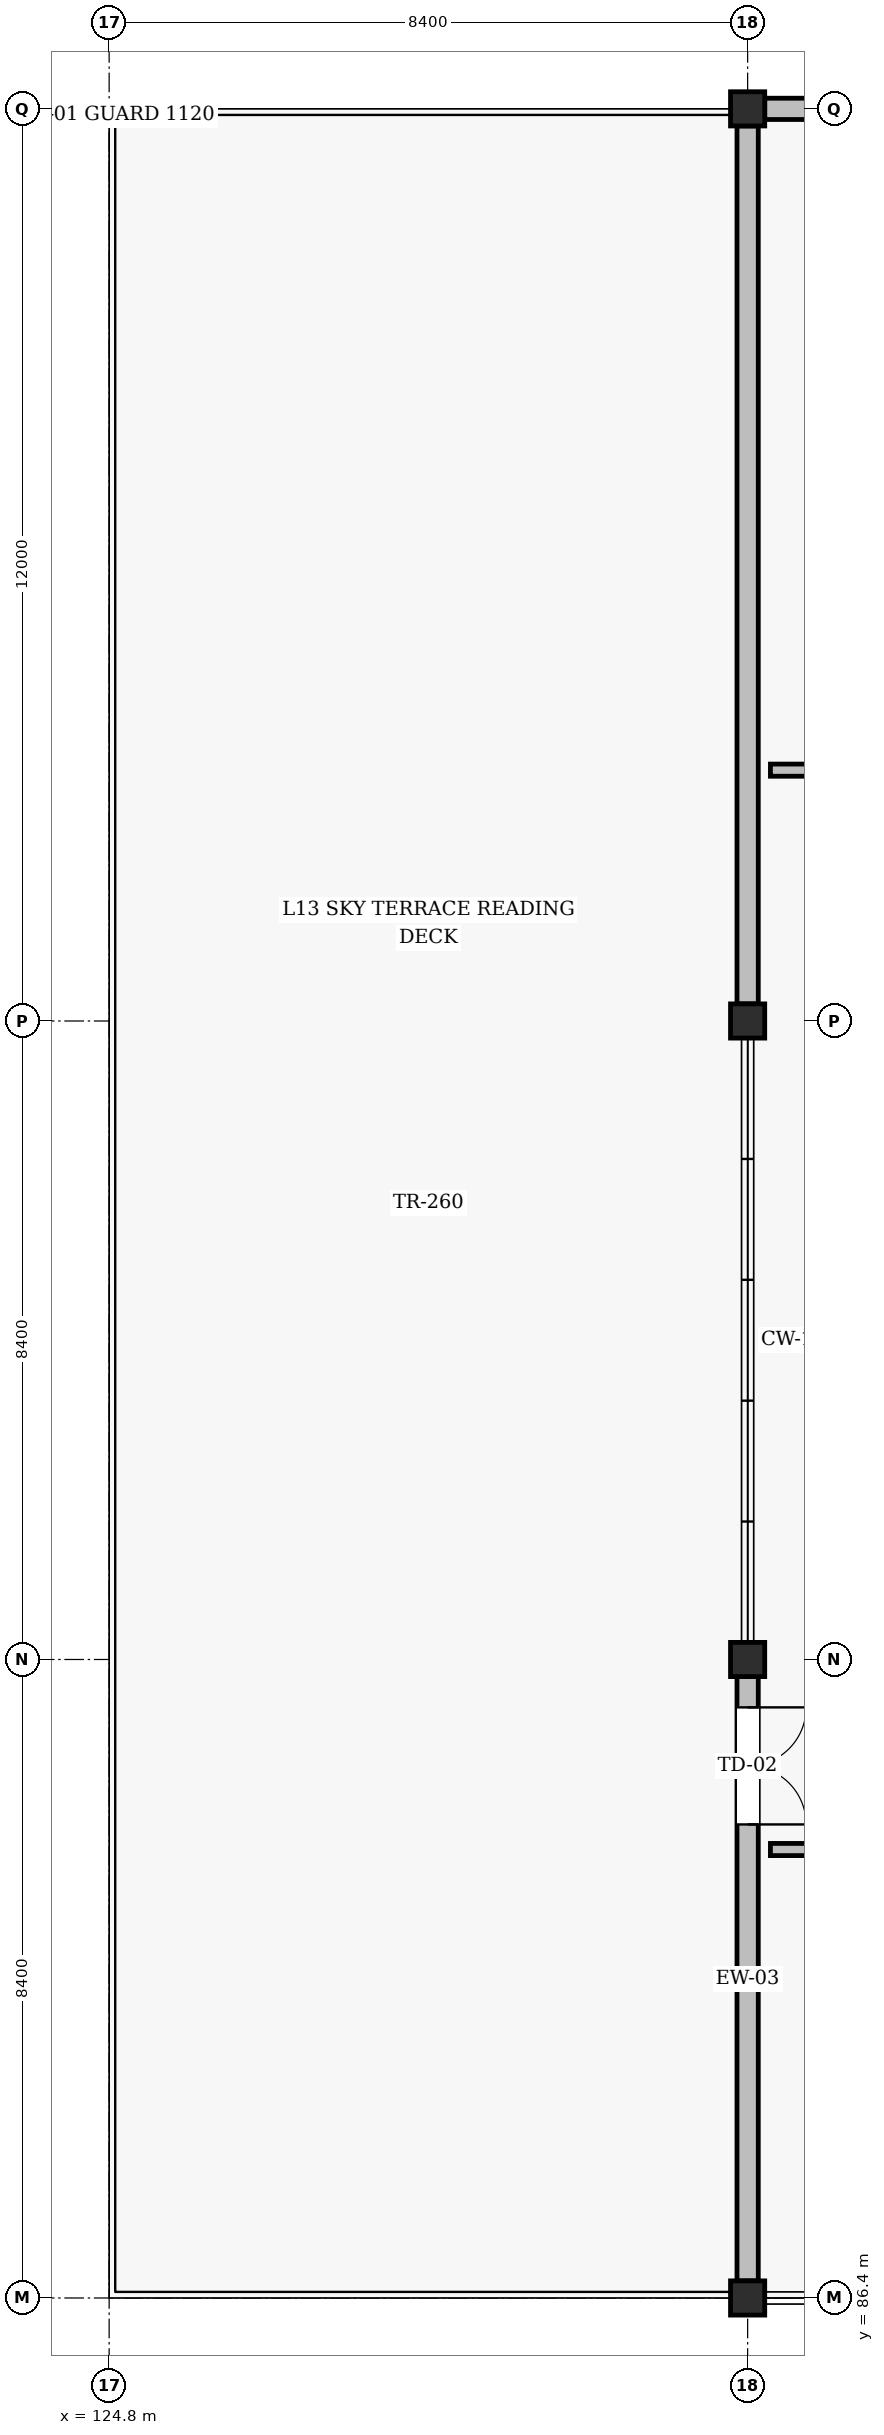
"""IFC4 building model, lengths in metres.
Left out: names, types, materials, properties, quantities, classifications, styles, units other than length and angle.
Written with IfcOpenShell. Run it as: python <this file> out.ifc"""

import sys

from ifc_helpers import new_model, si_unit, direction, frame, frame_2d, origin, origin_2d, place, context, subcontext, project, spatial, rectangle, hollow_rectangle, extrude, element, fill, save


model = new_model("IFC4")
c1 = context("Model", 3, precision=1e-05, world=origin(), true_north=direction((0.0, 1.0)))
c2 = subcontext(c1, "Body", "Model", "MODEL_VIEW")
j1 = project(units=[si_unit("LENGTHUNIT", "METRE"), si_unit("PLANEANGLEUNIT", "RADIAN")], contexts=[c1])
p1 = place(None, origin())
s1 = spatial("IfcSite", under=j1, at=p1, CompositionType="ELEMENT")
p2 = place(p1, origin())
s2 = spatial("IfcBuilding", under=s1, at=p2, CompositionType="ELEMENT")
p3 = place(p2, frame((0.0, 0.0, 50.4)))
s3 = spatial("IfcBuildingStorey", under=s2, at=p3, CompositionType="ELEMENT", Elevation=50.4)
for number, where, z_axis, x_axis in (
    (1, (133.2, 86.4, 0.0), (0.0, 0.0, 1.0), (1.0, 0.0, 0.0)),
    (2, (133.2, 94.8, 0.0), (0.0, 0.0, 1.0), (1.0, 0.0, 0.0)),
    (3, (133.2, 103.2, 0.0), (0.0, 0.0, 1.0), (1.0, 0.0, 0.0)),
    (4, (133.2, 115.2, 0.0), (0.0, 0.0, 1.0), (1.0, 0.0, 0.0)),
):
    element("IfcColumn", number, at=place(p3, frame(where, z_axis=z_axis, x_axis=x_axis)), inside=s3, PredefinedType="COLUMN", context=c2, shape_type="SweptSolid", body=[
        extrude(hollow_rectangle(XDim=0.45, YDim=0.45, WallThickness=0.018, InnerFilletRadius=0.018, OuterFilletRadius=0.036, at=origin_2d()), origin(), (0.0, 0.0, 1.0), 3.6),
    ])
p4 = place(p3, frame((141.375, 115.2, 0.0), z_axis=(0.0, 0.0, 1.0), x_axis=(-1.0, 0.0, 0.0)))
e5 = element("IfcWall", 5, at=p4, inside=s3, PredefinedType="SOLIDWALL", context=c2, shape_type="SweptSolid", body=[
    extrude(rectangle(XDim=7.95, YDim=0.28, at=frame_2d((3.975, 0.0))), origin(), (0.0, 0.0, 1.0), 2.846),
])
p5 = place(p3, frame((133.2, 114.975, 0.0), z_axis=(0.0, 0.0, 1.0), x_axis=(0.0, -1.0, 0.0)))
e6 = element("IfcWall", 6, at=p5, inside=s3, PredefinedType="SOLIDWALL", context=c2, shape_type="SweptSolid", body=[
    extrude(rectangle(XDim=11.55, YDim=0.28, at=frame_2d((5.775, 0.0))), origin(), (0.0, 0.0, 1.0), 2.554),
])
p6 = place(p3, frame((133.2, 94.575, 0.0), z_axis=(0.0, 0.0, 1.0), x_axis=(0.0, -1.0, 0.0)))
e7 = element("IfcWall", 7, at=p6, inside=s3, PredefinedType="SOLIDWALL", context=c2, shape_type="SweptSolid", body=[
    extrude(rectangle(XDim=7.95, YDim=0.28, at=frame_2d((3.975, 0.0))), origin(), (0.0, 0.0, 1.0), 2.846),
])
p7 = place(p6, frame((0.405, 0.0, 0.0)))
e8 = element("IfcOpeningElement", 8, at=p7, cuts=e7, PredefinedType="OPENING", context=c2, shape_type="SweptSolid", body=[
    extrude(rectangle(XDim=1.54, YDim=2.24, at=frame_2d((0.77, 1.12))), frame((0.0, 0.15, 0.0), z_axis=(0.0, -1.0, 0.0), x_axis=(1.0, 0.0, 0.0)), (0.0, 0.0, 1.0), 0.3),
])
p8 = place(p3, frame((133.5, 92.3, 0.0), z_axis=(0.0, 0.0, 1.0), x_axis=(1.0, 0.0, 0.0)))
e9 = element("IfcWall", 9, at=p8, inside=s3, PredefinedType="PARTITIONING", context=c2, shape_type="SweptSolid", body=[
    extrude(rectangle(XDim=13.0, YDim=0.16, at=frame_2d((6.5, 0.0))), origin(), (0.0, 0.0, 1.0), 2.846),
])
p9 = place(p8, frame((5.9, 0.0, 0.0)))
e10 = element("IfcOpeningElement", 10, at=p9, cuts=e9, PredefinedType="OPENING", context=c2, shape_type="SweptSolid", body=[
    extrude(rectangle(XDim=1.25, YDim=2.12, at=frame_2d((0.625, 1.06))), frame((0.0, 0.09, 0.0), z_axis=(0.0, -1.0, 0.0), x_axis=(1.0, 0.0, 0.0)), (0.0, 0.0, 1.0), 0.18),
])
p10 = place(p3, frame((133.5, 106.5, 0.0), z_axis=(0.0, 0.0, 1.0), x_axis=(1.0, 0.0, 0.0)))
e11 = element("IfcWall", 11, at=p10, inside=s3, PredefinedType="PARTITIONING", context=c2, shape_type="SweptSolid", body=[
    extrude(rectangle(XDim=11.1, YDim=0.16, at=frame_2d((5.55, 0.0))), origin(), (0.0, 0.0, 1.0), 2.646),
])
p11 = place(p10, frame((4.85, 0.0, 0.0)))
e12 = element("IfcOpeningElement", 12, at=p11, cuts=e11, PredefinedType="OPENING", context=c2, shape_type="SweptSolid", body=[
    extrude(rectangle(XDim=1.4, YDim=2.1, at=frame_2d((0.7, 1.05))), frame((0.0, 0.09, 0.0), z_axis=(0.0, -1.0, 0.0), x_axis=(1.0, 0.0, 0.0)), (0.0, 0.0, 1.0), 0.18),
])
p12 = place(p7, frame((1.54, 0.0, 0.0), z_axis=(0.0, 0.0, 1.0), x_axis=(-1.0, 0.0, 0.0)))
e13 = element("IfcDoor", 13, at=p12, inside=s3, OperationType="DOUBLE_DOOR_SINGLE_SWING", PredefinedType="DOOR", context=c2, shape_type="SweptSolid", body=[
    extrude(rectangle(XDim=1.54, YDim=2.24, at=frame_2d((0.77, 1.12))), frame((0.0, 0.025, 0.0), z_axis=(0.0, -1.0, 0.0), x_axis=(1.0, 0.0, 0.0)), (0.0, 0.0, 1.0), 0.05),
])
fill(e8, e13)
save(model, sys.argv[1])
